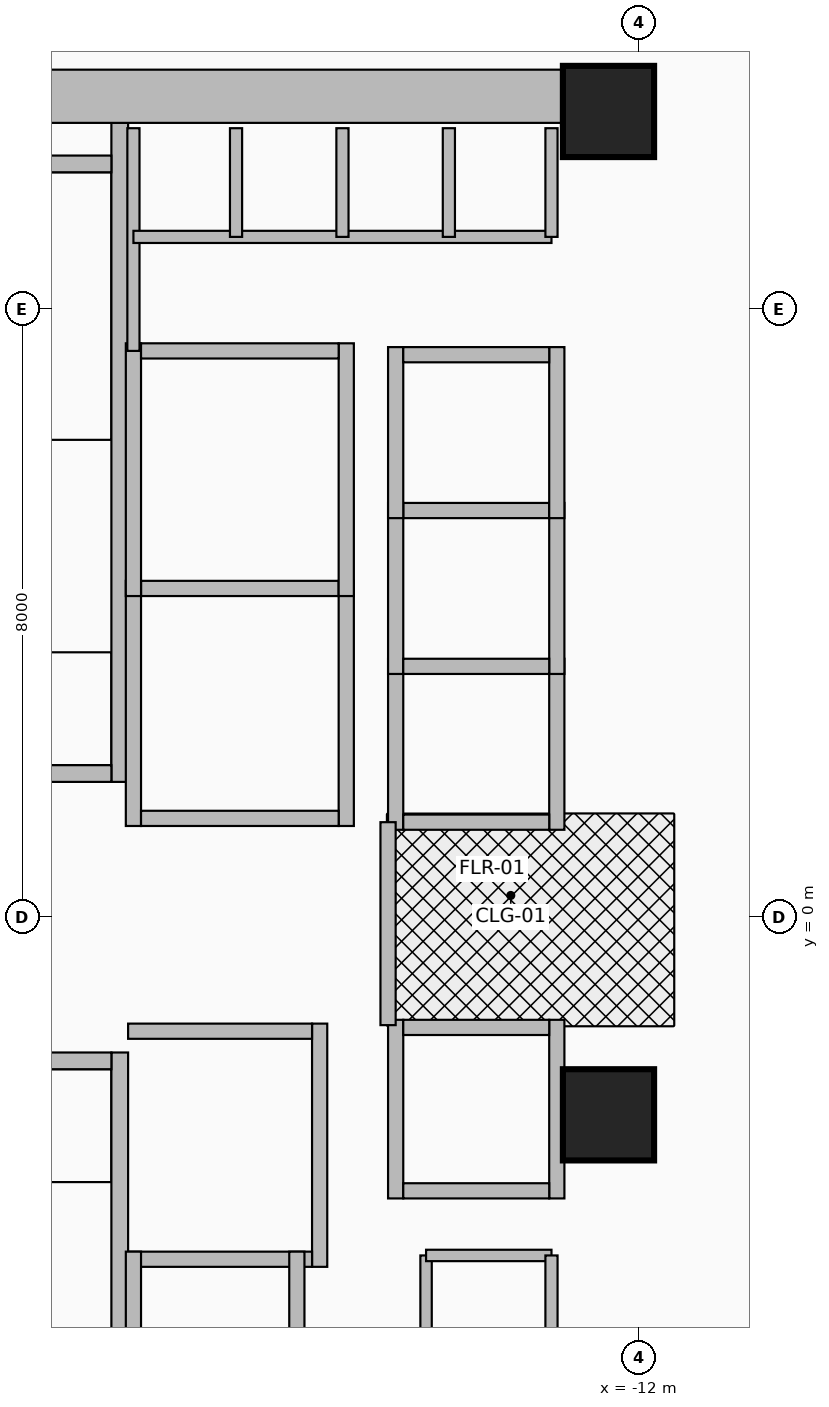
"""IFC4 building model, lengths in metres.
Left out: names, types, materials, properties, quantities, classifications, styles, units other than length and angle.
Written with IfcOpenShell. Run it as: python <this file> out.ifc"""

import sys

from ifc_helpers import new_model, si_unit, direction, frame, frame_2d, origin, origin_2d, place, context, subcontext, project, spatial, rectangle, extrude, source, transform, mapped, element, fill, save


model = new_model("IFC4")
c1 = context("Model", 3, precision=1e-05, world=origin(), true_north=direction((0.0, 1.0)))
c2 = subcontext(c1, "Body", "Model", "MODEL_VIEW")
j1 = project(units=[si_unit("LENGTHUNIT", "METRE"), si_unit("PLANEANGLEUNIT", "RADIAN")], contexts=[c1])
p1 = place(None, origin())
s1 = spatial("IfcSite", under=j1, at=p1, CompositionType="ELEMENT")
p2 = place(p1, origin())
s2 = spatial("IfcBuilding", under=s1, at=p2, CompositionType="ELEMENT")
p3 = place(p2, frame((0.0, 0.0, 109.4)))
s3 = spatial("IfcBuildingStorey", under=s2, at=p3, CompositionType="ELEMENT", Elevation=109.4)
p4 = place(p3, frame((-18.83, 1.78, 0.0), z_axis=(0.0, 0.0, 1.0), x_axis=(0.0, 1.0, 0.0)))
e1 = element("IfcWall", 1, at=p4, inside=s3, PredefinedType="SHEAR", context=c2, shape_type="SweptSolid", body=[
    extrude(rectangle(XDim=8.67, YDim=0.22, at=frame_2d((4.335, 0.0))), origin(), (0.0, 0.0, 1.0), 3.46),
])
p5 = place(p3, frame((-22.05, 1.89, 0.0), z_axis=(0.0, 0.0, 1.0), x_axis=(1.0, 0.0, 0.0)))
e2 = element("IfcWall", 2, at=p5, inside=s3, PredefinedType="SHEAR", context=c2, shape_type="SweptSolid", body=[
    extrude(rectangle(XDim=3.11, YDim=0.22, at=frame_2d((1.555, 0.0))), origin(), (0.0, 0.0, 1.0), 3.46),
])
p6 = place(p5, frame((1.0, 0.0, 0.0)))
e3 = element("IfcOpeningElement", 3, at=p6, cuts=e2, PredefinedType="OPENING", context=c2, shape_type="SweptSolid", body=[
    extrude(rectangle(XDim=1.1, YDim=2.15, at=frame_2d((0.55, 1.075))), frame((0.0, 0.125, 0.0), z_axis=(0.0, -1.0, 0.0), x_axis=(1.0, 0.0, 0.0)), (0.0, 0.0, 1.0), 0.25),
])
p7 = place(p3, frame((-22.05, 9.91, 0.0), z_axis=(0.0, 0.0, 1.0), x_axis=(1.0, 0.0, 0.0)))
e4 = element("IfcWall", 4, at=p7, inside=s3, PredefinedType="SHEAR", context=c2, shape_type="SweptSolid", body=[
    extrude(rectangle(XDim=3.11, YDim=0.22, at=frame_2d((1.555, 0.0))), origin(), (0.0, 0.0, 1.0), 3.46),
])
p8 = place(p3, frame((-18.83, -10.45, 0.0), z_axis=(0.0, 0.0, 1.0), x_axis=(0.0, 1.0, 0.0)))
e5 = element("IfcWall", 5, at=p8, inside=s3, PredefinedType="SHEAR", context=c2, shape_type="SweptSolid", body=[
    extrude(rectangle(XDim=8.67, YDim=0.22, at=frame_2d((4.335, 0.0))), origin(), (0.0, 0.0, 1.0), 3.46),
])
p9 = place(p3, frame((-22.05, -1.89, 0.0), z_axis=(0.0, 0.0, 1.0), x_axis=(1.0, 0.0, 0.0)))
e6 = element("IfcWall", 6, at=p9, inside=s3, PredefinedType="SHEAR", context=c2, shape_type="SweptSolid", body=[
    extrude(rectangle(XDim=3.11, YDim=0.22, at=frame_2d((1.555, 0.0))), origin(), (0.0, 0.0, 1.0), 3.46),
])
p10 = place(p9, frame((1.0, 0.0, 0.0)))
e7 = element("IfcOpeningElement", 7, at=p10, cuts=e6, PredefinedType="OPENING", context=c2, shape_type="SweptSolid", body=[
    extrude(rectangle(XDim=1.1, YDim=2.15, at=frame_2d((0.55, 1.075))), frame((0.0, 0.125, 0.0), z_axis=(0.0, -1.0, 0.0), x_axis=(1.0, 0.0, 0.0)), (0.0, 0.0, 1.0), 0.25),
])
p11 = place(p3, frame((-22.65, 10.8, 0.0), z_axis=(0.0, 0.0, 1.0), x_axis=(1.0, 0.0, 0.0)))
e8 = element("IfcWall", 8, at=p11, inside=s3, PredefinedType="SHEAR", context=c2, shape_type="SweptSolid", body=[
    extrude(rectangle(XDim=10.25, YDim=0.7, at=frame_2d((5.125, 0.0))), origin(), (0.0, 0.0, 1.0), 3.46),
])
m1 = source(origin(), c2, "Body", "SweptSolid", [
    extrude(rectangle(XDim=1.2, YDim=1.2, at=origin_2d()), origin(), (0.0, 0.0, 1.0), 3.7),
])
for number, where, z_axis, x_axis in (
    (9, (-12.4, -2.6, 0.0), (0.0, 0.0, 1.0), (1.0, 0.0, 0.0)),
    (10, (-12.4, 10.6, 0.0), (0.0, 0.0, 1.0), (1.0, 0.0, 0.0)),
):
    element("IfcColumn", number, at=place(p3, frame(where, z_axis=z_axis, x_axis=x_axis)), inside=s3, PredefinedType="COLUMN", context=c2, shape_type="MappedRepresentation", body=[
        mapped(m1, transform((0.0, 0.0, 0.0), x_axis=(1.0, 0.0, 0.0), y_axis=(0.0, 1.0, 0.0), z_axis=(0.0, 0.0, 1.0), scale=1.0)),
    ])
for number, where, z_axis, x_axis in (
    (11, (-18.65, 1.2, 0.0), (0.0, 0.0, 1.0), (0.0, 1.0, 0.0)),
    (12, (-15.85, 1.2, 0.0), (0.0, 0.0, 1.0), (0.0, 1.0, 0.0)),
):
    element("IfcWall", number, at=place(p3, frame(where, z_axis=z_axis, x_axis=x_axis)), inside=s3, PredefinedType="MOVABLE", context=c2, shape_type="SweptSolid", body=[
        extrude(rectangle(XDim=3.225, YDim=0.2, at=frame_2d((1.613, 0.0))), origin(), (0.0, 0.0, 1.0), 3.46),
    ])
p12 = place(p3, frame((-18.55, 1.3, 0.0), z_axis=(0.0, 0.0, 1.0), x_axis=(1.0, 0.0, 0.0)))
e13 = element("IfcWall", 13, at=p12, inside=s3, PredefinedType="MOVABLE", context=c2, shape_type="SweptSolid", body=[
    extrude(rectangle(XDim=2.6, YDim=0.2, at=frame_2d((1.3, 0.0))), origin(), (0.0, 0.0, 1.0), 3.46),
])
p13 = place(p12, frame((0.7, 0.0, 0.0)))
e14 = element("IfcOpeningElement", 14, at=p13, cuts=e13, PredefinedType="OPENING", context=c2, shape_type="SweptSolid", body=[
    extrude(rectangle(XDim=1.2, YDim=2.1, at=frame_2d((0.6, 1.05))), frame((0.0, 0.115, 0.0), z_axis=(0.0, -1.0, 0.0), x_axis=(1.0, 0.0, 0.0)), (0.0, 0.0, 1.0), 0.23),
])
p14 = place(p3, frame((-18.55, 4.325, 0.0), z_axis=(0.0, 0.0, 1.0), x_axis=(1.0, 0.0, 0.0)))
e15 = element("IfcWall", 15, at=p14, inside=s3, PredefinedType="MOVABLE", context=c2, shape_type="SweptSolid", body=[
    extrude(rectangle(XDim=2.6, YDim=0.2, at=frame_2d((1.3, 0.0))), origin(), (0.0, 0.0, 1.0), 3.46),
])
p15 = place(p3, frame((-16.2, -4.6, 0.0), z_axis=(0.0, 0.0, 1.0), x_axis=(0.0, 1.0, 0.0)))
e16 = element("IfcWall", 16, at=p15, inside=s3, PredefinedType="MOVABLE", context=c2, shape_type="SweptSolid", body=[
    extrude(rectangle(XDim=3.2, YDim=0.2, at=frame_2d((1.6, 0.0))), origin(), (0.0, 0.0, 1.0), 3.46),
])
p16 = place(p3, frame((-18.72, -4.5, 0.0), z_axis=(0.0, 0.0, 1.0), x_axis=(1.0, 0.0, 0.0)))
e17 = element("IfcWall", 17, at=p16, inside=s3, PredefinedType="MOVABLE", context=c2, shape_type="SweptSolid", body=[
    extrude(rectangle(XDim=2.42, YDim=0.2, at=frame_2d((1.21, 0.0))), origin(), (0.0, 0.0, 1.0), 3.46),
])
p17 = place(p3, frame((-18.72, -1.5, 0.0), z_axis=(0.0, 0.0, 1.0), x_axis=(1.0, 0.0, 0.0)))
e18 = element("IfcWall", 18, at=p17, inside=s3, PredefinedType="MOVABLE", context=c2, shape_type="SweptSolid", body=[
    extrude(rectangle(XDim=2.42, YDim=0.2, at=frame_2d((1.21, 0.0))), origin(), (0.0, 0.0, 1.0), 3.46),
])
p18 = place(p17, frame((0.61, 0.0, 0.0)))
e19 = element("IfcOpeningElement", 19, at=p18, cuts=e18, PredefinedType="OPENING", context=c2, shape_type="SweptSolid", body=[
    extrude(rectangle(XDim=1.2, YDim=2.1, at=frame_2d((0.6, 1.05))), frame((0.0, 0.115, 0.0), z_axis=(0.0, -1.0, 0.0), x_axis=(1.0, 0.0, 0.0)), (0.0, 0.0, 1.0), 0.23),
])
for number, where, z_axis, x_axis in (
    (20, (-18.65, 4.225, 0.0), (0.0, 0.0, 1.0), (0.0, 1.0, 0.0)),
    (21, (-15.85, 4.225, 0.0), (0.0, 0.0, 1.0), (0.0, 1.0, 0.0)),
):
    element("IfcWall", number, at=place(p3, frame(where, z_axis=z_axis, x_axis=x_axis)), inside=s3, PredefinedType="MOVABLE", context=c2, shape_type="SweptSolid", body=[
        extrude(rectangle(XDim=3.325, YDim=0.2, at=frame_2d((1.663, 0.0))), origin(), (0.0, 0.0, 1.0), 3.46),
    ])
p19 = place(p3, frame((-18.55, 7.45, 0.0), z_axis=(0.0, 0.0, 1.0), x_axis=(1.0, 0.0, 0.0)))
e22 = element("IfcWall", 22, at=p19, inside=s3, PredefinedType="MOVABLE", context=c2, shape_type="SweptSolid", body=[
    extrude(rectangle(XDim=2.6, YDim=0.2, at=frame_2d((1.3, 0.0))), origin(), (0.0, 0.0, 1.0), 3.46),
])
p20 = place(p19, frame((0.7, 0.0, 0.0)))
e23 = element("IfcOpeningElement", 23, at=p20, cuts=e22, PredefinedType="OPENING", context=c2, shape_type="SweptSolid", body=[
    extrude(rectangle(XDim=1.2, YDim=2.1, at=frame_2d((0.6, 1.05))), frame((0.0, 0.115, 0.0), z_axis=(0.0, -1.0, 0.0), x_axis=(1.0, 0.0, 0.0)), (0.0, 0.0, 1.0), 0.23),
])
p21 = place(p3, frame((-15.2, 1.15, 0.0), z_axis=(0.0, 0.0, 1.0), x_axis=(0.0, 1.0, 0.0)))
e24 = element("IfcWall", 24, at=p21, inside=s3, PredefinedType="MOVABLE", context=c2, shape_type="SweptSolid", body=[
    extrude(rectangle(XDim=2.25, YDim=0.2, at=frame_2d((1.125, 0.0))), origin(), (0.0, 0.0, 1.0), 3.46),
])
p22 = place(p3, frame((-13.08, 1.15, 0.0), z_axis=(0.0, 0.0, 1.0), x_axis=(0.0, 1.0, 0.0)))
e25 = element("IfcWall", 25, at=p22, inside=s3, PredefinedType="MOVABLE", context=c2, shape_type="SweptSolid", body=[
    extrude(rectangle(XDim=2.25, YDim=0.2, at=frame_2d((1.125, 0.0))), origin(), (0.0, 0.0, 1.0), 3.46),
])
p23 = place(p22, frame((0.575, 0.0, 0.0)))
e26 = element("IfcOpeningElement", 26, at=p23, cuts=e25, PredefinedType="OPENING", context=c2, shape_type="SweptSolid", body=[
    extrude(rectangle(XDim=1.1, YDim=2.1, at=frame_2d((0.55, 1.05))), frame((0.0, 0.115, 0.0), z_axis=(0.0, -1.0, 0.0), x_axis=(1.0, 0.0, 0.0)), (0.0, 0.0, 1.0), 0.23),
])
p24 = place(p3, frame((-15.1, 1.25, 0.0), z_axis=(0.0, 0.0, 1.0), x_axis=(1.0, 0.0, 0.0)))
e27 = element("IfcWall", 27, at=p24, inside=s3, PredefinedType="MOVABLE", context=c2, shape_type="SweptSolid", body=[
    extrude(rectangle(XDim=1.92, YDim=0.2, at=frame_2d((0.96, 0.0))), origin(), (0.0, 0.0, 1.0), 3.46),
])
for number, where, z_axis, x_axis in (
    (28, (-15.2, 3.2, 0.0), (0.0, 0.0, 1.0), (0.0, 1.0, 0.0)),
    (29, (-13.08, 3.2, 0.0), (0.0, 0.0, 1.0), (0.0, 1.0, 0.0)),
):
    element("IfcWall", number, at=place(p3, frame(where, z_axis=z_axis, x_axis=x_axis)), inside=s3, PredefinedType="MOVABLE", context=c2, shape_type="SweptSolid", body=[
        extrude(rectangle(XDim=2.25, YDim=0.2, at=frame_2d((1.125, 0.0))), origin(), (0.0, 0.0, 1.0), 3.46),
    ])
for number, where, z_axis, x_axis in (
    (30, (-15.1, 3.3, 0.0), (0.0, 0.0, 1.0), (1.0, 0.0, 0.0)),
    (31, (-15.1, 5.35, 0.0), (0.0, 0.0, 1.0), (1.0, 0.0, 0.0)),
):
    element("IfcWall", number, at=place(p3, frame(where, z_axis=z_axis, x_axis=x_axis)), inside=s3, PredefinedType="MOVABLE", context=c2, shape_type="SweptSolid", body=[
        extrude(rectangle(XDim=1.92, YDim=0.2, at=frame_2d((0.96, 0.0))), origin(), (0.0, 0.0, 1.0), 3.46),
    ])
for number, where, z_axis, x_axis in (
    (32, (-15.2, 5.25, 0.0), (0.0, 0.0, 1.0), (0.0, 1.0, 0.0)),
    (33, (-13.08, 5.25, 0.0), (0.0, 0.0, 1.0), (0.0, 1.0, 0.0)),
):
    element("IfcWall", number, at=place(p3, frame(where, z_axis=z_axis, x_axis=x_axis)), inside=s3, PredefinedType="MOVABLE", context=c2, shape_type="SweptSolid", body=[
        extrude(rectangle(XDim=2.25, YDim=0.2, at=frame_2d((1.125, 0.0))), origin(), (0.0, 0.0, 1.0), 3.46),
    ])
p25 = place(p3, frame((-15.1, 7.4, 0.0), z_axis=(0.0, 0.0, 1.0), x_axis=(1.0, 0.0, 0.0)))
e34 = element("IfcWall", 34, at=p25, inside=s3, PredefinedType="MOVABLE", context=c2, shape_type="SweptSolid", body=[
    extrude(rectangle(XDim=1.92, YDim=0.2, at=frame_2d((0.96, 0.0))), origin(), (0.0, 0.0, 1.0), 3.46),
])
for number, where, z_axis, x_axis in (
    (35, (-18.65, -6.7, 0.0), (0.0, 0.0, 1.0), (0.0, 1.0, 0.0)),
    (36, (-16.5, -6.7, 0.0), (0.0, 0.0, 1.0), (0.0, 1.0, 0.0)),
):
    element("IfcWall", number, at=place(p3, frame(where, z_axis=z_axis, x_axis=x_axis)), inside=s3, PredefinedType="MOVABLE", context=c2, shape_type="SweptSolid", body=[
        extrude(rectangle(XDim=2.3, YDim=0.2, at=frame_2d((1.15, 0.0))), origin(), (0.0, 0.0, 1.0), 3.46),
    ])
for number, where, z_axis, x_axis in (
    (37, (-15.2, -3.7, 0.0), (0.0, 0.0, 1.0), (0.0, 1.0, 0.0)),
    (38, (-13.08, -3.7, 0.0), (0.0, 0.0, 1.0), (0.0, 1.0, 0.0)),
):
    element("IfcWall", number, at=place(p3, frame(where, z_axis=z_axis, x_axis=x_axis)), inside=s3, PredefinedType="MOVABLE", context=c2, shape_type="SweptSolid", body=[
        extrude(rectangle(XDim=2.35, YDim=0.2, at=frame_2d((1.175, 0.0))), origin(), (0.0, 0.0, 1.0), 3.46),
    ])
for number, where, z_axis, x_axis in (
    (39, (-15.1, -3.6, 0.0), (0.0, 0.0, 1.0), (1.0, 0.0, 0.0)),
    (40, (-15.1, -1.45, 0.0), (0.0, 0.0, 1.0), (1.0, 0.0, 0.0)),
):
    element("IfcWall", number, at=place(p3, frame(where, z_axis=z_axis, x_axis=x_axis)), inside=s3, PredefinedType="MOVABLE", context=c2, shape_type="SweptSolid", body=[
        extrude(rectangle(XDim=1.92, YDim=0.2, at=frame_2d((0.96, 0.0))), origin(), (0.0, 0.0, 1.0), 3.46),
    ])
p26 = place(p3, frame((-15.3, -1.42, 0.0), z_axis=(0.0, 0.0, 1.0), x_axis=(0.0, 1.0, 0.0)))
e41 = element("IfcWall", 41, at=p26, inside=s3, PredefinedType="PARTITIONING", context=c2, shape_type="SweptSolid", body=[
    extrude(rectangle(XDim=2.67, YDim=0.2, at=frame_2d((1.335, 0.0))), origin(), (0.0, 0.0, 1.0), 3.46),
])
p27 = place(p26, frame((0.78, 0.0, 0.0)))
e42 = element("IfcOpeningElement", 42, at=p27, cuts=e41, PredefinedType="OPENING", context=c2, shape_type="SweptSolid", body=[
    extrude(rectangle(XDim=1.05, YDim=2.15, at=frame_2d((0.525, 1.075))), frame((0.0, 0.115, 0.0), z_axis=(0.0, -1.0, 0.0), x_axis=(1.0, 0.0, 0.0)), (0.0, 0.0, 1.0), 0.23),
])
p28 = place(p3, frame((-18.65, 7.45, 0.0), z_axis=(0.0, 0.0, 1.0), x_axis=(0.0, 1.0, 0.0)))
e43 = element("IfcWall", 43, at=p28, inside=s3, PredefinedType="PARTITIONING", context=c2, shape_type="SweptSolid", body=[
    extrude(rectangle(XDim=2.93, YDim=0.16, at=frame_2d((1.465, 0.0))), origin(), (0.0, 0.0, 1.0), 3.46),
])
p29 = place(p3, frame((-18.65, 8.95, 0.0), z_axis=(0.0, 0.0, 1.0), x_axis=(1.0, 0.0, 0.0)))
e44 = element("IfcWall", 44, at=p29, inside=s3, PredefinedType="PARTITIONING", context=c2, shape_type="SweptSolid", body=[
    extrude(rectangle(XDim=5.5, YDim=0.16, at=frame_2d((2.75, 0.0))), origin(), (0.0, 0.0, 1.0), 3.46),
])
p30 = place(p29, frame((0.3, 0.0, 0.0)))
e45 = element("IfcOpeningElement", 45, at=p30, cuts=e44, PredefinedType="OPENING", context=c2, shape_type="SweptSolid", body=[
    extrude(rectangle(XDim=0.85, YDim=2.05, at=frame_2d((0.425, 1.025))), frame((0.0, 0.095, 0.0), z_axis=(0.0, -1.0, 0.0), x_axis=(1.0, 0.0, 0.0)), (0.0, 0.0, 1.0), 0.19),
])
p31 = place(p29, frame((1.55, 0.0, 0.0)))
e46 = element("IfcOpeningElement", 46, at=p31, cuts=e44, PredefinedType="OPENING", context=c2, shape_type="SweptSolid", body=[
    extrude(rectangle(XDim=0.85, YDim=2.05, at=frame_2d((0.425, 1.025))), frame((0.0, 0.095, 0.0), z_axis=(0.0, -1.0, 0.0), x_axis=(1.0, 0.0, 0.0)), (0.0, 0.0, 1.0), 0.19),
])
p32 = place(p29, frame((2.95, 0.0, 0.0)))
e47 = element("IfcOpeningElement", 47, at=p32, cuts=e44, PredefinedType="OPENING", context=c2, shape_type="SweptSolid", body=[
    extrude(rectangle(XDim=0.85, YDim=2.05, at=frame_2d((0.425, 1.025))), frame((0.0, 0.095, 0.0), z_axis=(0.0, -1.0, 0.0), x_axis=(1.0, 0.0, 0.0)), (0.0, 0.0, 1.0), 0.19),
])
p33 = place(p29, frame((4.35, 0.0, 0.0)))
e48 = element("IfcOpeningElement", 48, at=p33, cuts=e44, PredefinedType="OPENING", context=c2, shape_type="SweptSolid", body=[
    extrude(rectangle(XDim=0.85, YDim=2.05, at=frame_2d((0.425, 1.025))), frame((0.0, 0.095, 0.0), z_axis=(0.0, -1.0, 0.0), x_axis=(1.0, 0.0, 0.0)), (0.0, 0.0, 1.0), 0.19),
])
for number, where, z_axis, x_axis in (
    (49, (-13.15, 8.95, 0.0), (0.0, 0.0, 1.0), (0.0, 1.0, 0.0)),
    (50, (-17.3, 8.95, 0.0), (0.0, 0.0, 1.0), (0.0, 1.0, 0.0)),
    (51, (-15.9, 8.95, 0.0), (0.0, 0.0, 1.0), (0.0, 1.0, 0.0)),
    (52, (-14.5, 8.95, 0.0), (0.0, 0.0, 1.0), (0.0, 1.0, 0.0)),
):
    element("IfcWall", number, at=place(p3, frame(where, z_axis=z_axis, x_axis=x_axis)), inside=s3, PredefinedType="PARTITIONING", context=c2, shape_type="SweptSolid", body=[
        extrude(rectangle(XDim=1.43, YDim=0.16, at=frame_2d((0.715, 0.0))), origin(), (0.0, 0.0, 1.0), 3.46),
    ])
p34 = place(p3, frame((-14.8, -6.58, 0.0), z_axis=(0.0, 0.0, 1.0), x_axis=(0.0, 1.0, 0.0)))
e53 = element("IfcWall", 53, at=p34, inside=s3, PredefinedType="PARTITIONING", context=c2, shape_type="SweptSolid", body=[
    extrude(rectangle(XDim=2.13, YDim=0.15, at=frame_2d((1.065, 0.0))), origin(), (0.0, 0.0, 1.0), 3.46),
])
p35 = place(p3, frame((-14.8, -4.45, 0.0), z_axis=(0.0, 0.0, 1.0), x_axis=(1.0, 0.0, 0.0)))
e54 = element("IfcWall", 54, at=p35, inside=s3, PredefinedType="PARTITIONING", context=c2, shape_type="SweptSolid", body=[
    extrude(rectangle(XDim=1.65, YDim=0.15, at=frame_2d((0.825, 0.0))), origin(), (0.0, 0.0, 1.0), 3.46),
])
p36 = place(p3, frame((-13.15, -6.58, 0.0), z_axis=(0.0, 0.0, 1.0), x_axis=(0.0, 1.0, 0.0)))
e55 = element("IfcWall", 55, at=p36, inside=s3, PredefinedType="PARTITIONING", context=c2, shape_type="SweptSolid", body=[
    extrude(rectangle(XDim=2.13, YDim=0.16, at=frame_2d((1.065, 0.0))), origin(), (0.0, 0.0, 1.0), 3.46),
])
p37 = place(p13, origin())
e56 = element("IfcDoor", 56, at=p37, inside=s3, OperationType="DOUBLE_DOOR_SLIDING", PredefinedType="DOOR", context=c2, shape_type="SweptSolid", body=[
    extrude(rectangle(XDim=1.2, YDim=2.1, at=frame_2d((0.6, 1.05))), frame((0.0, 0.025, 0.0), z_axis=(0.0, -1.0, 0.0), x_axis=(1.0, 0.0, 0.0)), (0.0, 0.0, 1.0), 0.05),
])
fill(e14, e56)
p38 = place(p18, origin())
e57 = element("IfcDoor", 57, at=p38, inside=s3, OperationType="DOUBLE_DOOR_SLIDING", PredefinedType="DOOR", context=c2, shape_type="SweptSolid", body=[
    extrude(rectangle(XDim=1.2, YDim=2.1, at=frame_2d((0.6, 1.05))), frame((0.0, 0.025, 0.0), z_axis=(0.0, -1.0, 0.0), x_axis=(1.0, 0.0, 0.0)), (0.0, 0.0, 1.0), 0.05),
])
fill(e19, e57)
p39 = place(p20, origin())
e58 = element("IfcDoor", 58, at=p39, inside=s3, OperationType="DOUBLE_DOOR_SLIDING", PredefinedType="DOOR", context=c2, shape_type="SweptSolid", body=[
    extrude(rectangle(XDim=1.2, YDim=2.1, at=frame_2d((0.6, 1.05))), frame((0.0, 0.025, 0.0), z_axis=(0.0, -1.0, 0.0), x_axis=(1.0, 0.0, 0.0)), (0.0, 0.0, 1.0), 0.05),
])
fill(e23, e58)
p40 = place(p23, origin())
e59 = element("IfcDoor", 59, at=p40, inside=s3, OperationType="DOUBLE_DOOR_SLIDING", PredefinedType="DOOR", context=c2, shape_type="SweptSolid", body=[
    extrude(rectangle(XDim=1.1, YDim=2.1, at=frame_2d((0.55, 1.05))), frame((0.0, 0.025, 0.0), z_axis=(0.0, -1.0, 0.0), x_axis=(1.0, 0.0, 0.0)), (0.0, 0.0, 1.0), 0.05),
])
fill(e26, e59)
p41 = place(p27, origin())
e60 = element("IfcDoor", 60, at=p41, inside=s3, OperationType="SINGLE_SWING_RIGHT", PredefinedType="DOOR", context=c2, shape_type="SweptSolid", body=[
    extrude(rectangle(XDim=1.05, YDim=2.15, at=frame_2d((0.525, 1.075))), frame((0.0, 0.025, 0.0), z_axis=(0.0, -1.0, 0.0), x_axis=(1.0, 0.0, 0.0)), (0.0, 0.0, 1.0), 0.05),
])
fill(e42, e60)
p42 = place(p30, origin())
e61 = element("IfcDoor", 61, at=p42, inside=s3, OperationType="SINGLE_SWING_LEFT", PredefinedType="DOOR", context=c2, shape_type="SweptSolid", body=[
    extrude(rectangle(XDim=0.85, YDim=2.05, at=frame_2d((0.425, 1.025))), frame((0.0, 0.025, 0.0), z_axis=(0.0, -1.0, 0.0), x_axis=(1.0, 0.0, 0.0)), (0.0, 0.0, 1.0), 0.05),
])
fill(e45, e61)
p43 = place(p31, origin())
e62 = element("IfcDoor", 62, at=p43, inside=s3, OperationType="SINGLE_SWING_RIGHT", PredefinedType="DOOR", context=c2, shape_type="SweptSolid", body=[
    extrude(rectangle(XDim=0.85, YDim=2.05, at=frame_2d((0.425, 1.025))), frame((0.0, 0.025, 0.0), z_axis=(0.0, -1.0, 0.0), x_axis=(1.0, 0.0, 0.0)), (0.0, 0.0, 1.0), 0.05),
])
fill(e46, e62)
p44 = place(p32, origin())
e63 = element("IfcDoor", 63, at=p44, inside=s3, OperationType="SINGLE_SWING_LEFT", PredefinedType="DOOR", context=c2, shape_type="SweptSolid", body=[
    extrude(rectangle(XDim=0.85, YDim=2.05, at=frame_2d((0.425, 1.025))), frame((0.0, 0.025, 0.0), z_axis=(0.0, -1.0, 0.0), x_axis=(1.0, 0.0, 0.0)), (0.0, 0.0, 1.0), 0.05),
])
fill(e47, e63)
p45 = place(p33, origin())
e64 = element("IfcDoor", 64, at=p45, inside=s3, OperationType="SINGLE_SWING_RIGHT", PredefinedType="DOOR", context=c2, shape_type="SweptSolid", body=[
    extrude(rectangle(XDim=0.85, YDim=2.05, at=frame_2d((0.425, 1.025))), frame((0.0, 0.025, 0.0), z_axis=(0.0, -1.0, 0.0), x_axis=(1.0, 0.0, 0.0)), (0.0, 0.0, 1.0), 0.05),
])
fill(e48, e64)
save(model, sys.argv[1])
